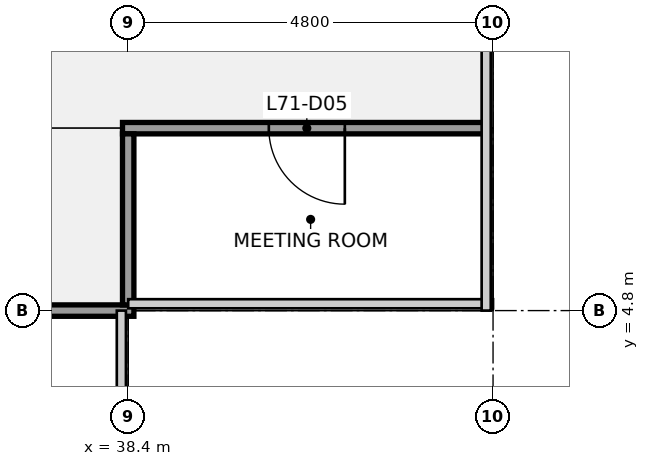
"""IFC4 building model, lengths in metres.
Left out: names, types, materials, properties, quantities, classifications, styles, units other than length and angle.
Written with IfcOpenShell. Run it as: python <this file> out.ifc"""

import sys

from ifc_helpers import new_model, si_unit, direction, frame, frame_2d, origin, place, context, subcontext, project, spatial, rectangle, extrude, element, fill, save


model = new_model("IFC4")
c1 = context("Model", 3, precision=1e-05, world=origin(), true_north=direction((0.0, 1.0)))
c2 = subcontext(c1, "Body", "Model", "MODEL_VIEW")
j1 = project(units=[si_unit("LENGTHUNIT", "METRE"), si_unit("PLANEANGLEUNIT", "RADIAN")], contexts=[c1])
p1 = place(None, origin())
s1 = spatial("IfcSite", under=j1, at=p1, CompositionType="ELEMENT")
p2 = place(p1, origin())
s2 = spatial("IfcBuilding", under=s1, at=p2, CompositionType="ELEMENT")
p3 = place(p2, frame((0.0, 0.0, 322.3)))
s3 = spatial("IfcBuildingStorey", under=s2, at=p3, CompositionType="ELEMENT", Elevation=322.3)
p4 = place(p3, frame((19.125, 4.8, 0.0), z_axis=(0.0, 0.0, 1.0), x_axis=(1.0, 0.0, 0.0)))
e1 = element("IfcWall", 1, at=p4, inside=s3, PredefinedType="PARTITIONING", context=c2, shape_type="SweptSolid", body=[
    extrude(rectangle(XDim=19.35, YDim=0.15, at=frame_2d((9.675, 0.0))), origin(), (0.0, 0.0, 1.0), 2.849),
])
p5 = place(p4, frame((4.375, 0.0, 0.0)))
e2 = element("IfcOpeningElement", 2, at=p5, cuts=e1, PredefinedType="OPENING", context=c2, shape_type="SweptSolid", body=[
    extrude(rectangle(XDim=1.0, YDim=2.1, at=frame_2d((0.5, 1.05))), frame((0.0, 0.085, 0.0), z_axis=(0.0, -1.0, 0.0), x_axis=(1.0, 0.0, 0.0)), (0.0, 0.0, 1.0), 0.17),
])
p6 = place(p4, frame((13.975, 0.0, 0.0)))
e3 = element("IfcOpeningElement", 3, at=p6, cuts=e1, PredefinedType="OPENING", context=c2, shape_type="SweptSolid", body=[
    extrude(rectangle(XDim=1.0, YDim=2.1, at=frame_2d((0.5, 1.05))), frame((0.0, 0.085, 0.0), z_axis=(0.0, -1.0, 0.0), x_axis=(1.0, 0.0, 0.0)), (0.0, 0.0, 1.0), 0.17),
])
p7 = place(p3, frame((38.325, 7.2, 0.0), z_axis=(0.0, 0.0, 1.0), x_axis=(1.0, 0.0, 0.0)))
e4 = element("IfcWall", 4, at=p7, inside=s3, PredefinedType="PARTITIONING", context=c2, shape_type="SweptSolid", body=[
    extrude(rectangle(XDim=4.775, YDim=0.15, at=frame_2d((2.388, 0.0))), origin(), (0.0, 0.0, 1.0), 2.849),
])
p8 = place(p7, frame((1.925, 0.0, 0.0)))
e5 = element("IfcOpeningElement", 5, at=p8, cuts=e4, PredefinedType="OPENING", context=c2, shape_type="SweptSolid", body=[
    extrude(rectangle(XDim=1.0, YDim=2.1, at=frame_2d((0.5, 1.05))), frame((0.0, 0.085, 0.0), z_axis=(0.0, -1.0, 0.0), x_axis=(1.0, 0.0, 0.0)), (0.0, 0.0, 1.0), 0.17),
])
p9 = place(p3, frame((38.4, 4.875, 0.0), z_axis=(0.0, 0.0, 1.0), x_axis=(0.0, 1.0, 0.0)))
e6 = element("IfcWall", 6, at=p9, inside=s3, PredefinedType="PARTITIONING", context=c2, shape_type="SweptSolid", body=[
    extrude(rectangle(XDim=2.25, YDim=0.15, at=frame_2d((1.125, 0.0))), origin(), (0.0, 0.0, 1.0), 2.849),
])
p10 = place(p8, origin())
e7 = element("IfcDoor", 7, at=p10, inside=s3, OperationType="SINGLE_SWING_RIGHT", PredefinedType="DOOR", context=c2, shape_type="SweptSolid", body=[
    extrude(rectangle(XDim=1.0, YDim=2.1, at=frame_2d((0.5, 1.05))), frame((0.0, 0.025, 0.0), z_axis=(0.0, -1.0, 0.0), x_axis=(1.0, 0.0, 0.0)), (0.0, 0.0, 1.0), 0.05),
])
fill(e5, e7)
save(model, sys.argv[1])
